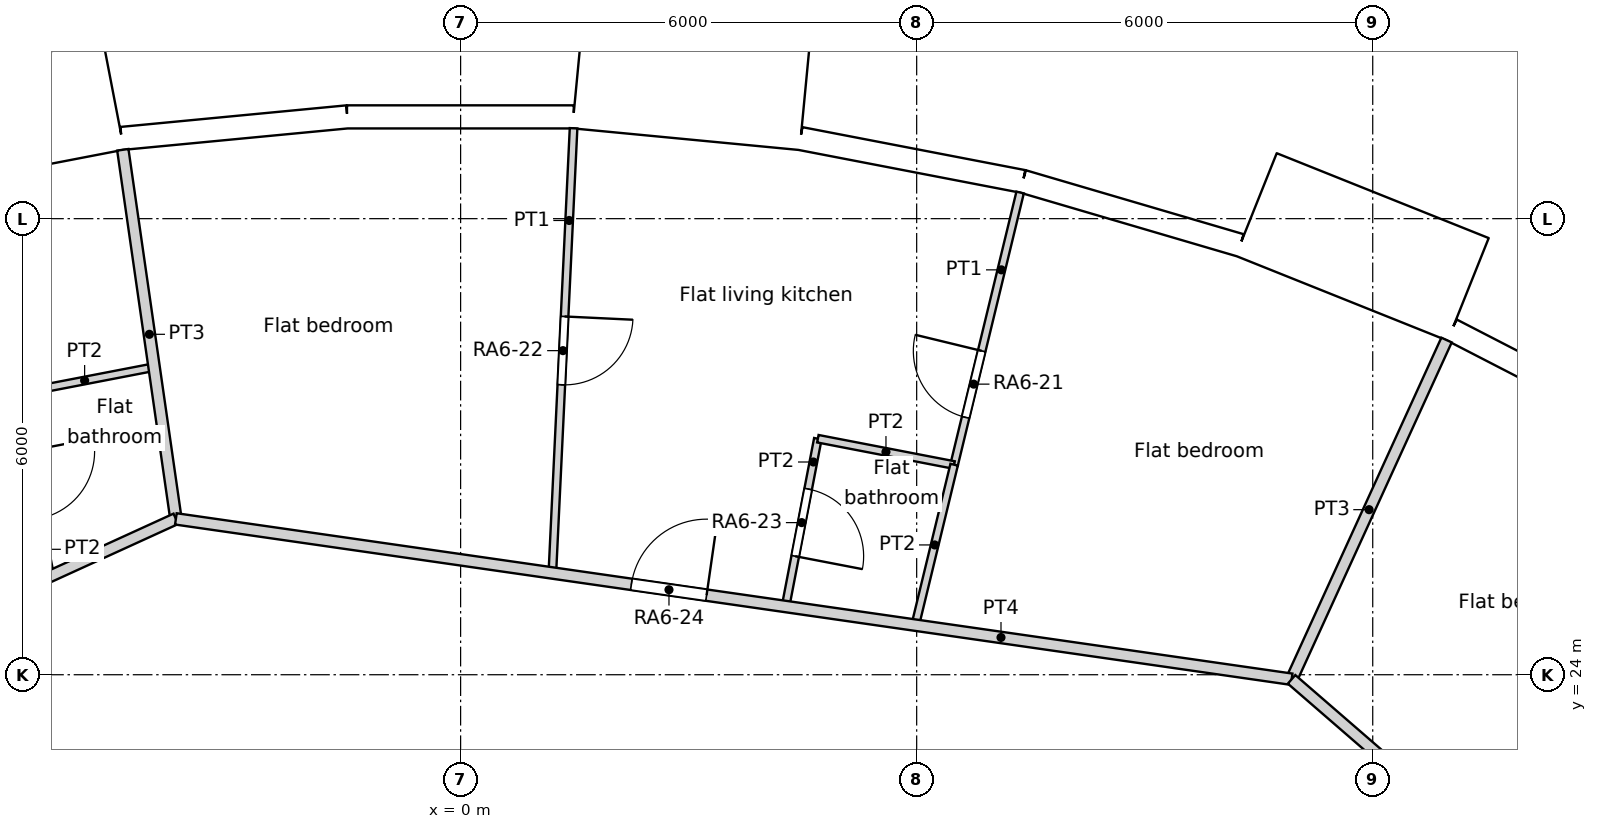
"""IFC4 building model, lengths in metres.
Left out: names, types, materials, properties, quantities, classifications, styles, units other than length and angle.
Written with IfcOpenShell. Run it as: python <this file> out.ifc"""

import sys

from ifc_helpers import new_model, si_unit, direction, frame, frame_2d, origin, origin_2d, place, context, subcontext, project, spatial, rectangle, circle, extrude, element, fill, save


model = new_model("IFC4")
c1 = context("Model", 3, precision=1e-05, world=origin(), true_north=direction((0.0, 1.0)))
c2 = subcontext(c1, "Body", "Model", "MODEL_VIEW")
j1 = project(units=[si_unit("LENGTHUNIT", "METRE"), si_unit("PLANEANGLEUNIT", "RADIAN")], contexts=[c1])
p1 = place(None, origin())
s1 = spatial("IfcSite", under=j1, at=p1, CompositionType="ELEMENT")
p2 = place(p1, origin())
s2 = spatial("IfcBuilding", under=s1, at=p2, CompositionType="ELEMENT")
p3 = place(p2, frame((0.0, 0.0, 82.2)))
s3 = spatial("IfcBuildingStorey", under=s2, at=p3, CompositionType="ELEMENT", Elevation=82.2)
for number, where, z_axis, x_axis in (
    (1, (12.576, 27.539, 0.0), (0.0, 0.0, 1.0), (1.0, 0.0, 0.0)),
    (2, (7.137, 29.421, 0.0), (0.0, 0.0, 1.0), (1.0, 0.0, 0.0)),
    (3, (1.44, 30.24, 0.0), (0.0, 0.0, 1.0), (1.0, 0.0, 0.0)),
    (4, (-4.309, 29.966, 0.0), (0.0, 0.0, 1.0), (1.0, 0.0, 0.0)),
):
    element("IfcColumn", number, at=place(p3, frame(where, z_axis=z_axis, x_axis=x_axis)), inside=s3, PredefinedType="COLUMN", context=c2, shape_type="SweptSolid", body=[
        extrude(circle(Radius=0.6, at=origin_2d()), origin(), (0.0, 0.0, 1.0), 3.6),
    ])
for number, where, z_axis, x_axis in (
    (5, (9.723, 22.54, 0.0), (0.0, 0.0, 1.0), (1.0, 0.0, 0.0)),
    (6, (4.263, 24.175, 0.0), (0.0, 0.0, 1.0), (1.0, 0.0, 0.0)),
    (7, (-1.427, 24.506, 0.0), (0.0, 0.0, 1.0), (1.0, 0.0, 0.0)),
):
    element("IfcColumn", number, at=place(p3, frame(where, z_axis=z_axis, x_axis=x_axis)), inside=s3, PredefinedType="COLUMN", context=c2, shape_type="SweptSolid", body=[
        extrude(circle(Radius=0.65, at=origin_2d()), origin(), (0.0, 0.0, 1.0), 3.6),
    ])
p4 = place(p3, frame((15.687, 27.171, 0.0), z_axis=(0.0, 0.0, 1.0), x_axis=(-0.888853225096, 0.4581920386, 0.0)))
e8 = element("IfcWall", 8, at=p4, inside=s3, PredefinedType="SOLIDWALL", context=c2, shape_type="SweptSolid", body=[
    extrude(rectangle(XDim=2.979, YDim=0.3, at=frame_2d((1.49, 0.0))), origin(), (0.0, 0.0, 1.0), 3.15),
])
p5 = place(p4, frame((1.49, 0.0, 1.55)))
e9 = element("IfcOpeningElement", 9, at=p5, cuts=e8, PredefinedType="OPENING", context=c2, shape_type="SweptSolid", body=[
    extrude(circle(Radius=0.9, at=origin_2d()), frame((0.0, 0.16, 0.0), z_axis=(0.0, -1.0, 0.0), x_axis=(1.0, 0.0, 0.0)), (0.0, 0.0, 1.0), 0.32),
])
p6 = place(p3, frame((13.254, 29.07, -0.45), z_axis=(0.0, 0.0, 1.0), x_axis=(-0.928358776184, 0.371685327504, 0.0)))
e10 = element("IfcWall", 10, at=p6, inside=s3, PredefinedType="ELEMENTEDWALL", context=c2, shape_type="SweptSolid", body=[
    extrude(rectangle(XDim=3.0, YDim=1.45, at=frame_2d((1.5, 0.0))), origin(), (0.0, 0.0, 1.0), 3.6),
])
p7 = place(p6, frame((1.5, 0.0, 2.0)))
e11 = element("IfcOpeningElement", 11, at=p7, cuts=e10, PredefinedType="OPENING", context=c2, shape_type="SweptSolid", body=[
    extrude(circle(Radius=0.9, at=origin_2d()), frame((0.0, 0.735, 0.0), z_axis=(0.0, -1.0, 0.0), x_axis=(1.0, 0.0, 0.0)), (0.0, 0.0, 1.0), 1.47),
])
p8 = place(p3, frame((10.256, 29.651, 0.0), z_axis=(0.0, 0.0, 1.0), x_axis=(-0.959507586834, 0.28168278401, 0.0)))
e12 = element("IfcWall", 12, at=p8, inside=s3, PredefinedType="SOLIDWALL", context=c2, shape_type="SweptSolid", body=[
    extrude(rectangle(XDim=2.98, YDim=0.3, at=frame_2d((1.49, 0.0))), origin(), (0.0, 0.0, 1.0), 3.15),
])
p9 = place(p8, frame((1.49, 0.0, 1.55)))
e13 = element("IfcOpeningElement", 13, at=p9, cuts=e12, PredefinedType="OPENING", context=c2, shape_type="SweptSolid", body=[
    extrude(circle(Radius=0.9, at=origin_2d()), frame((0.0, 0.16, 0.0), z_axis=(0.0, -1.0, 0.0), x_axis=(1.0, 0.0, 0.0)), (0.0, 0.0, 1.0), 0.32),
])
p10 = place(p3, frame((7.397, 30.49, 0.0), z_axis=(0.0, 0.0, 1.0), x_axis=(-0.981924535406, 0.189272836848, 0.0)))
e14 = element("IfcWall", 14, at=p10, inside=s3, PredefinedType="SOLIDWALL", context=c2, shape_type="SweptSolid", body=[
    extrude(rectangle(XDim=2.98, YDim=0.3, at=frame_2d((1.49, 0.0))), origin(), (0.0, 0.0, 1.0), 3.15),
])
p11 = place(p10, frame((1.49, 0.0, 1.55)))
e15 = element("IfcOpeningElement", 15, at=p11, cuts=e14, PredefinedType="OPENING", context=c2, shape_type="SweptSolid", body=[
    extrude(circle(Radius=0.9, at=origin_2d()), frame((0.0, 0.16, 0.0), z_axis=(0.0, -1.0, 0.0), x_axis=(1.0, 0.0, 0.0)), (0.0, 0.0, 1.0), 0.32),
])
p12 = place(p3, frame((4.527, 31.627, -0.45), z_axis=(0.0, 0.0, 1.0), x_axis=(-0.995472768558, 0.09504718333, 0.0)))
e16 = element("IfcWall", 16, at=p12, inside=s3, PredefinedType="ELEMENTEDWALL", context=c2, shape_type="SweptSolid", body=[
    extrude(rectangle(XDim=3.0, YDim=1.45, at=frame_2d((1.5, 0.0))), origin(), (0.0, 0.0, 1.0), 3.6),
])
p13 = place(p12, frame((1.5, 0.0, 2.0)))
e17 = element("IfcOpeningElement", 17, at=p13, cuts=e16, PredefinedType="OPENING", context=c2, shape_type="SweptSolid", body=[
    extrude(circle(Radius=0.9, at=origin_2d()), frame((0.0, 0.735, 0.0), z_axis=(0.0, -1.0, 0.0), x_axis=(1.0, 0.0, 0.0)), (0.0, 0.0, 1.0), 1.47),
])
p14 = place(p3, frame((1.487, 31.339, 0.0), z_axis=(0.0, 0.0, 1.0), x_axis=(-1.0, 0.0, 0.0)))
e18 = element("IfcWall", 18, at=p14, inside=s3, PredefinedType="SOLIDWALL", context=c2, shape_type="SweptSolid", body=[
    extrude(rectangle(XDim=2.98, YDim=0.3, at=frame_2d((1.49, 0.0))), origin(), (0.0, 0.0, 1.0), 3.15),
])
p15 = place(p14, frame((1.49, 0.0, 1.55)))
e19 = element("IfcOpeningElement", 19, at=p15, cuts=e18, PredefinedType="OPENING", context=c2, shape_type="SweptSolid", body=[
    extrude(circle(Radius=0.9, at=origin_2d()), frame((0.0, 0.16, 0.0), z_axis=(0.0, -1.0, 0.0), x_axis=(1.0, 0.0, 0.0)), (0.0, 0.0, 1.0), 0.32),
])
p16 = place(p3, frame((-1.493, 31.339, 0.0), z_axis=(0.0, 0.0, 1.0), x_axis=(-0.995472611385, -0.095048829468, 0.0)))
e20 = element("IfcWall", 20, at=p16, inside=s3, PredefinedType="SOLIDWALL", context=c2, shape_type="SweptSolid", body=[
    extrude(rectangle(XDim=2.979, YDim=0.3, at=frame_2d((1.49, 0.0))), origin(), (0.0, 0.0, 1.0), 3.15),
])
p17 = place(p16, frame((1.49, 0.0, 1.55)))
e21 = element("IfcOpeningElement", 21, at=p17, cuts=e20, PredefinedType="OPENING", context=c2, shape_type="SweptSolid", body=[
    extrude(circle(Radius=0.9, at=origin_2d()), frame((0.0, 0.16, 0.0), z_axis=(0.0, -1.0, 0.0), x_axis=(1.0, 0.0, 0.0)), (0.0, 0.0, 1.0), 0.32),
])
p18 = place(p3, frame((-4.567, 31.621, -0.45), z_axis=(0.0, 0.0, 1.0), x_axis=(-0.981921602273, -0.189288052949, 0.0)))
e22 = element("IfcWall", 22, at=p18, inside=s3, PredefinedType="ELEMENTEDWALL", context=c2, shape_type="SweptSolid", body=[
    extrude(rectangle(XDim=3.0, YDim=1.45, at=frame_2d((1.5, 0.0))), origin(), (0.0, 0.0, 1.0), 3.6),
])
p19 = place(p18, frame((1.5, 0.0, 2.0)))
e23 = element("IfcOpeningElement", 23, at=p19, cuts=e22, PredefinedType="OPENING", context=c2, shape_type="SweptSolid", body=[
    extrude(circle(Radius=0.9, at=origin_2d()), frame((0.0, 0.735, 0.0), z_axis=(0.0, -1.0, 0.0), x_axis=(1.0, 0.0, 0.0)), (0.0, 0.0, 1.0), 1.47),
])
p20 = place(p3, frame((10.932, 23.939, 0.0), z_axis=(0.0, 0.0, 1.0), x_axis=(0.755823777664, -0.654775088956, 0.0)))
e24 = element("IfcWall", 24, at=p20, inside=s3, PredefinedType="PARTITIONING", context=c2, shape_type="SweptSolid", body=[
    extrude(rectangle(XDim=14.83, YDim=0.15, at=frame_2d((7.415, 0.0))), origin(), (0.0, 0.0, 1.0), 3.15),
])
p21 = place(p20, frame((6.604, 0.0, 0.0)))
e25 = element("IfcOpeningElement", 25, at=p21, cuts=e24, PredefinedType="OPENING", context=c2, shape_type="SweptSolid", body=[
    extrude(rectangle(XDim=1.0, YDim=2.1, at=frame_2d((0.5, 1.05))), frame((0.0, 0.075, 0.0), z_axis=(0.0, -1.0, 0.0), x_axis=(1.0, 0.0, 0.0)), (0.0, 0.0, 1.0), 0.15),
])
p22 = place(p3, frame((-3.746, 26.05, 0.0), z_axis=(0.0, 0.0, 1.0), x_axis=(0.989832601965, -0.14223719657, 0.0)))
e26 = element("IfcWall", 26, at=p22, inside=s3, PredefinedType="PARTITIONING", context=c2, shape_type="SweptSolid", body=[
    extrude(rectangle(XDim=14.83, YDim=0.15, at=frame_2d((7.415, 0.0))), origin(), (0.0, 0.0, 1.0), 3.15),
])
p23 = place(p22, frame((6.054, 0.0, 0.0)))
e27 = element("IfcOpeningElement", 27, at=p23, cuts=e26, PredefinedType="OPENING", context=c2, shape_type="SweptSolid", body=[
    extrude(rectangle(XDim=1.0, YDim=2.1, at=frame_2d((0.5, 1.05))), frame((0.0, 0.075, 0.0), z_axis=(0.0, -1.0, 0.0), x_axis=(1.0, 0.0, 0.0)), (0.0, 0.0, 1.0), 0.15),
])
p24 = place(p3, frame((-17.236, 19.891, 0.0), z_axis=(0.0, 0.0, 1.0), x_axis=(0.909645678785, 0.415385049163, 0.0)))
e28 = element("IfcWall", 28, at=p24, inside=s3, PredefinedType="PARTITIONING", context=c2, shape_type="SweptSolid", body=[
    extrude(rectangle(XDim=14.829, YDim=0.15, at=frame_2d((7.415, 0.0))), origin(), (0.0, 0.0, 1.0), 3.15),
])
p25 = place(p24, frame((11.569, 0.0, 0.0)))
e29 = element("IfcOpeningElement", 29, at=p25, cuts=e28, PredefinedType="OPENING", context=c2, shape_type="SweptSolid", body=[
    extrude(rectangle(XDim=1.0, YDim=2.1, at=frame_2d((0.5, 1.05))), frame((0.0, 0.075, 0.0), z_axis=(0.0, -1.0, 0.0), x_axis=(1.0, 0.0, 0.0)), (0.0, 0.0, 1.0), 0.15),
])
p26 = place(p24, frame((1.134, 0.0, 0.0)))
e30 = element("IfcOpeningElement", 30, at=p26, cuts=e28, PredefinedType="OPENING", context=c2, shape_type="SweptSolid", body=[
    extrude(rectangle(XDim=1.0, YDim=2.1, at=frame_2d((0.5, 1.05))), frame((0.0, 0.075, 0.0), z_axis=(0.0, -1.0, 0.0), x_axis=(1.0, 0.0, 0.0)), (0.0, 0.0, 1.0), 0.15),
])
p27 = place(p3, frame((10.933, 23.94, 0.0), z_axis=(0.0, 0.0, 1.0), x_axis=(0.415346954488, 0.909663073559, 0.0)))
e31 = element("IfcWall", 31, at=p27, inside=s3, PredefinedType="PARTITIONING", context=c2, shape_type="SweptSolid", body=[
    extrude(rectangle(XDim=4.906, YDim=0.15, at=frame_2d((2.453, 0.0))), origin(), (0.0, 0.0, 1.0), 3.15),
])
p28 = place(p3, frame((6.492, 26.759, 0.0), z_axis=(0.0, 0.0, 1.0), x_axis=(0.235615179614, 0.971846431868, 0.0)))
e32 = element("IfcWall", 32, at=p28, inside=s3, PredefinedType="PARTITIONING", context=c2, shape_type="SweptSolid", body=[
    extrude(rectangle(XDim=3.689, YDim=0.1, at=frame_2d((1.844, 0.0))), origin(), (0.0, 0.0, 1.0), 3.15),
])
p29 = place(p28, frame((0.645, 0.0, 0.0)))
e33 = element("IfcOpeningElement", 33, at=p29, cuts=e32, PredefinedType="OPENING", context=c2, shape_type="SweptSolid", body=[
    extrude(rectangle(XDim=0.9, YDim=2.1, at=frame_2d((0.45, 1.05))), frame((0.0, 0.05, 0.0), z_axis=(0.0, -1.0, 0.0), x_axis=(1.0, 0.0, 0.0)), (0.0, 0.0, 1.0), 0.1),
])
p30 = place(p3, frame((1.207, 25.339, 0.0), z_axis=(0.0, 0.0, 1.0), x_axis=(0.047648334785, 0.998864173045, 0.0)))
e34 = element("IfcWall", 34, at=p30, inside=s3, PredefinedType="PARTITIONING", context=c2, shape_type="SweptSolid", body=[
    extrude(rectangle(XDim=5.856, YDim=0.1, at=frame_2d((2.928, 0.0))), origin(), (0.0, 0.0, 1.0), 3.15),
])
p31 = place(p30, frame((2.478, 0.0, 0.0)))
e35 = element("IfcOpeningElement", 35, at=p31, cuts=e34, PredefinedType="OPENING", context=c2, shape_type="SweptSolid", body=[
    extrude(rectangle(XDim=0.9, YDim=2.1, at=frame_2d((0.45, 1.05))), frame((0.0, 0.05, 0.0), z_axis=(0.0, -1.0, 0.0), x_axis=(1.0, 0.0, 0.0)), (0.0, 0.0, 1.0), 0.1),
])
p32 = place(p3, frame((4.7, 27.105, 0.0), z_axis=(0.0, 0.0, 1.0), x_axis=(0.981870706953, -0.189551878985, 0.0)))
e36 = element("IfcWall", 36, at=p32, inside=s3, PredefinedType="PARTITIONING", context=c2, shape_type="SweptSolid", body=[
    extrude(rectangle(XDim=1.825, YDim=0.1, at=frame_2d((0.913, 0.0))), origin(), (0.0, 0.0, 1.0), 3.15),
])
p33 = place(p3, frame((4.275, 24.898, 0.0), z_axis=(0.0, 0.0, 1.0), x_axis=(0.189113289302, 0.98195527587, 0.0)))
e37 = element("IfcWall", 37, at=p33, inside=s3, PredefinedType="PARTITIONING", context=c2, shape_type="SweptSolid", body=[
    extrude(rectangle(XDim=2.248, YDim=0.1, at=frame_2d((1.124, 0.0))), origin(), (0.0, 0.0, 1.0), 3.15),
])
p34 = place(p33, frame((0.674, 0.0, 0.0)))
e38 = element("IfcOpeningElement", 38, at=p34, cuts=e37, PredefinedType="OPENING", context=c2, shape_type="SweptSolid", body=[
    extrude(rectangle(XDim=0.9, YDim=2.0, at=frame_2d((0.45, 1.0))), frame((0.0, 0.05, 0.0), z_axis=(0.0, -1.0, 0.0), x_axis=(1.0, 0.0, 0.0)), (0.0, 0.0, 1.0), 0.1),
])
p35 = place(p3, frame((5.981, 24.652, 0.0), z_axis=(0.0, 0.0, 1.0), x_axis=(0.235706186713, 0.971824363527, 0.0)))
e39 = element("IfcWall", 39, at=p35, inside=s3, PredefinedType="PARTITIONING", context=c2, shape_type="SweptSolid", body=[
    extrude(rectangle(XDim=2.172, YDim=0.1, at=frame_2d((1.086, 0.0))), origin(), (0.0, 0.0, 1.0), 3.15),
])
p36 = place(p3, frame((-4.444, 30.906, 0.0), z_axis=(0.0, 0.0, 1.0), x_axis=(0.142452592463, -0.989801626035, 0.0)))
e40 = element("IfcWall", 40, at=p36, inside=s3, PredefinedType="PARTITIONING", context=c2, shape_type="SweptSolid", body=[
    extrude(rectangle(XDim=4.905, YDim=0.15, at=frame_2d((2.453, 0.0))), origin(), (0.0, 0.0, 1.0), 3.15),
])
p37 = place(p3, frame((-5.861, 27.694, 0.0), z_axis=(0.0, 0.0, 1.0), x_axis=(0.981879093558, 0.189508431565, 0.0)))
e41 = element("IfcWall", 41, at=p37, inside=s3, PredefinedType="PARTITIONING", context=c2, shape_type="SweptSolid", body=[
    extrude(rectangle(XDim=1.863, YDim=0.1, at=frame_2d((0.931, 0.0))), origin(), (0.0, 0.0, 1.0), 3.15),
])
p38 = place(p3, frame((-5.861, 27.694, 0.0), z_axis=(0.0, 0.0, 1.0), x_axis=(0.189229262293, -0.981932933704, 0.0)))
e42 = element("IfcWall", 42, at=p38, inside=s3, PredefinedType="PARTITIONING", context=c2, shape_type="SweptSolid", body=[
    extrude(rectangle(XDim=2.442, YDim=0.1, at=frame_2d((1.221, 0.0))), origin(), (0.0, 0.0, 1.0), 3.15),
])
p39 = place(p38, frame((0.771, 0.0, 0.0)))
e43 = element("IfcOpeningElement", 43, at=p39, cuts=e42, PredefinedType="OPENING", context=c2, shape_type="SweptSolid", body=[
    extrude(rectangle(XDim=0.9, YDim=2.0, at=frame_2d((0.45, 1.0))), frame((0.0, 0.05, 0.0), z_axis=(0.0, -1.0, 0.0), x_axis=(1.0, 0.0, 0.0)), (0.0, 0.0, 1.0), 0.1),
])
p40 = place(p5, origin())
e44 = element("IfcWindow", 44, at=p40, inside=s3, PartitioningType="SINGLE_PANEL", PredefinedType="WINDOW", context=c2, shape_type="SweptSolid", body=[
    extrude(circle(Radius=0.9, at=origin_2d()), frame((0.0, 0.12, 0.0), z_axis=(0.0, -1.0, 0.0), x_axis=(1.0, 0.0, 0.0)), (0.0, 0.0, 1.0), 0.1),
])
fill(e9, e44)
p41 = place(p7, origin())
e45 = element("IfcWindow", 45, at=p41, inside=s3, PartitioningType="SINGLE_PANEL", PredefinedType="WINDOW", context=c2, shape_type="SweptSolid", body=[
    extrude(circle(Radius=0.9, at=origin_2d()), frame((0.0, 0.695, 0.0), z_axis=(0.0, -1.0, 0.0), x_axis=(1.0, 0.0, 0.0)), (0.0, 0.0, 1.0), 0.1),
])
fill(e11, e45)
p42 = place(p9, origin())
e46 = element("IfcWindow", 46, at=p42, inside=s3, PartitioningType="SINGLE_PANEL", PredefinedType="WINDOW", context=c2, shape_type="SweptSolid", body=[
    extrude(circle(Radius=0.9, at=origin_2d()), frame((0.0, 0.12, 0.0), z_axis=(0.0, -1.0, 0.0), x_axis=(1.0, 0.0, 0.0)), (0.0, 0.0, 1.0), 0.1),
])
fill(e13, e46)
p43 = place(p11, origin())
e47 = element("IfcWindow", 47, at=p43, inside=s3, PartitioningType="SINGLE_PANEL", PredefinedType="WINDOW", context=c2, shape_type="SweptSolid", body=[
    extrude(circle(Radius=0.9, at=origin_2d()), frame((0.0, 0.12, 0.0), z_axis=(0.0, -1.0, 0.0), x_axis=(1.0, 0.0, 0.0)), (0.0, 0.0, 1.0), 0.1),
])
fill(e15, e47)
p44 = place(p13, origin())
e48 = element("IfcWindow", 48, at=p44, inside=s3, PartitioningType="SINGLE_PANEL", PredefinedType="WINDOW", context=c2, shape_type="SweptSolid", body=[
    extrude(circle(Radius=0.9, at=origin_2d()), frame((0.0, 0.695, 0.0), z_axis=(0.0, -1.0, 0.0), x_axis=(1.0, 0.0, 0.0)), (0.0, 0.0, 1.0), 0.1),
])
fill(e17, e48)
p45 = place(p15, origin())
e49 = element("IfcWindow", 49, at=p45, inside=s3, PartitioningType="SINGLE_PANEL", PredefinedType="WINDOW", context=c2, shape_type="SweptSolid", body=[
    extrude(circle(Radius=0.9, at=origin_2d()), frame((0.0, 0.12, 0.0), z_axis=(0.0, -1.0, 0.0), x_axis=(1.0, 0.0, 0.0)), (0.0, 0.0, 1.0), 0.1),
])
fill(e19, e49)
p46 = place(p17, origin())
e50 = element("IfcWindow", 50, at=p46, inside=s3, PartitioningType="SINGLE_PANEL", PredefinedType="WINDOW", context=c2, shape_type="SweptSolid", body=[
    extrude(circle(Radius=0.9, at=origin_2d()), frame((0.0, 0.12, 0.0), z_axis=(0.0, -1.0, 0.0), x_axis=(1.0, 0.0, 0.0)), (0.0, 0.0, 1.0), 0.1),
])
fill(e21, e50)
p47 = place(p19, origin())
e51 = element("IfcWindow", 51, at=p47, inside=s3, PartitioningType="SINGLE_PANEL", PredefinedType="WINDOW", context=c2, shape_type="SweptSolid", body=[
    extrude(circle(Radius=0.9, at=origin_2d()), frame((0.0, 0.695, 0.0), z_axis=(0.0, -1.0, 0.0), x_axis=(1.0, 0.0, 0.0)), (0.0, 0.0, 1.0), 0.1),
])
fill(e23, e51)
p48 = place(p29, origin())
e52 = element("IfcDoor", 52, at=p48, inside=s3, OperationType="SINGLE_SWING_RIGHT", PredefinedType="DOOR", context=c2, shape_type="SweptSolid", body=[
    extrude(rectangle(XDim=0.9, YDim=2.1, at=frame_2d((0.45, 1.05))), frame((0.0, 0.025, 0.0), z_axis=(0.0, -1.0, 0.0), x_axis=(1.0, 0.0, 0.0)), (0.0, 0.0, 1.0), 0.05),
])
fill(e33, e52)
p49 = place(p31, origin())
e53 = element("IfcDoor", 53, at=p49, inside=s3, OperationType="SINGLE_SWING_LEFT", PredefinedType="DOOR", context=c2, shape_type="SweptSolid", body=[
    extrude(rectangle(XDim=0.9, YDim=2.1, at=frame_2d((0.45, 1.05))), frame((0.0, 0.025, 0.0), z_axis=(0.0, -1.0, 0.0), x_axis=(1.0, 0.0, 0.0)), (0.0, 0.0, 1.0), 0.05),
])
fill(e35, e53)
p50 = place(p34, origin())
e54 = element("IfcDoor", 54, at=p50, inside=s3, OperationType="SINGLE_SWING_RIGHT", PredefinedType="DOOR", context=c2, shape_type="SweptSolid", body=[
    extrude(rectangle(XDim=0.9, YDim=2.0, at=frame_2d((0.45, 1.0))), frame((0.0, 0.025, 0.0), z_axis=(0.0, -1.0, 0.0), x_axis=(1.0, 0.0, 0.0)), (0.0, 0.0, 1.0), 0.05),
])
fill(e38, e54)
p51 = place(p23, origin())
e55 = element("IfcDoor", 55, at=p51, inside=s3, OperationType="SINGLE_SWING_RIGHT", PredefinedType="DOOR", context=c2, shape_type="SweptSolid", body=[
    extrude(rectangle(XDim=1.0, YDim=2.1, at=frame_2d((0.5, 1.05))), frame((0.0, 0.025, 0.0), z_axis=(0.0, -1.0, 0.0), x_axis=(1.0, 0.0, 0.0)), (0.0, 0.0, 1.0), 0.05),
])
fill(e27, e55)
save(model, sys.argv[1])
